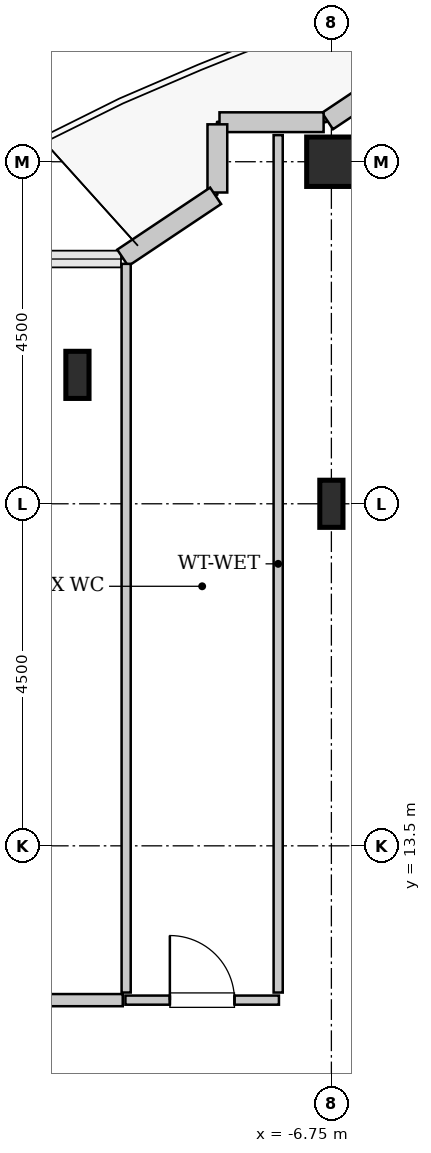
"""IFC4 building model, lengths in metres.
Left out: names, types, materials, properties, quantities, classifications, styles, units other than length and angle.
Written with IfcOpenShell. Run it as: python <this file> out.ifc"""

import sys

from ifc_helpers import new_model, si_unit, direction, frame, frame_2d, origin, origin_2d, place, context, subcontext, project, spatial, rectangle, hollow_rectangle, i_section, extrude, source, transform, mapped, element, fill, save


model = new_model("IFC4")
c1 = context("Model", 3, precision=1e-05, world=origin(), true_north=direction((0.0, 1.0)))
c2 = subcontext(c1, "Body", "Model", "MODEL_VIEW")
j1 = project(units=[si_unit("LENGTHUNIT", "METRE"), si_unit("PLANEANGLEUNIT", "RADIAN")], contexts=[c1])
p1 = place(None, origin())
s1 = spatial("IfcSite", under=j1, at=p1, CompositionType="ELEMENT")
p2 = place(p1, origin())
s2 = spatial("IfcBuilding", under=s1, at=p2, CompositionType="ELEMENT")
p3 = place(p2, frame((0.0, 0.0, 268.4)))
s3 = spatial("IfcBuildingStorey", under=s2, at=p3, CompositionType="ELEMENT", Elevation=268.4)
m1 = source(origin(), c2, "Body", "SweptSolid", [
    extrude(i_section(OverallWidth=0.305, OverallDepth=0.62, WebThickness=0.021, FlangeThickness=0.04, FilletRadius=0.027, at=origin_2d()), origin(), (0.0, 0.0, 1.0), 3.8),
])
for number, where, z_axis, x_axis in (
    (1, (-10.091, 19.696, 0.0), (0.0, 0.0, 1.0), (1.0, 0.0, 0.0)),
    (2, (-6.75, 18.0, 0.0), (0.0, 0.0, 1.0), (1.0, 0.0, 0.0)),
):
    element("IfcColumn", number, at=place(p3, frame(where, z_axis=z_axis, x_axis=x_axis)), inside=s3, PredefinedType="COLUMN", context=c2, shape_type="MappedRepresentation", body=[
        mapped(m1, transform((0.0, 0.0, 0.0), x_axis=(1.0, 0.0, 0.0), y_axis=(0.0, 1.0, 0.0), z_axis=(0.0, 0.0, 1.0), scale=1.0)),
    ])
m2 = source(origin(), c2, "Body", "SweptSolid", [
    extrude(hollow_rectangle(XDim=0.65, YDim=0.65, WallThickness=0.032, InnerFilletRadius=0.032, OuterFilletRadius=0.064, at=origin_2d()), origin(), (0.0, 0.0, 1.0), 3.8),
])
p4 = place(p3, frame((-6.75, 22.5, 0.0), z_axis=(0.0, 0.0, 1.0), x_axis=(1.0, 0.0, 0.0)))
e3 = element("IfcColumn", 3, at=p4, inside=s3, PredefinedType="COLUMN", context=c2, shape_type="MappedRepresentation", body=[
    mapped(m2, transform((0.0, 0.0, 0.0), x_axis=(1.0, 0.0, 0.0), y_axis=(0.0, 1.0, 0.0), z_axis=(0.0, 0.0, 1.0), scale=1.0)),
])
m3 = source(origin(), c2, "Body", "SweptSolid", [
    extrude(rectangle(XDim=0.565, YDim=0.26, at=frame_2d((0.283, 0.0))), origin(), (0.0, 0.0, 1.0), 3.55),
])
p5 = place(p3, frame((-6.331, 23.35, 0.0), z_axis=(0.0, 0.0, 1.0), x_axis=(-0.831651492666, -0.555297933317, 0.0)))
e4 = element("IfcWall", 4, at=p5, inside=s3, PredefinedType="SOLIDWALL", context=c2, shape_type="MappedRepresentation", body=[
    mapped(m3, transform((0.0, 0.0, 0.0), x_axis=(1.0, 0.0, 0.0), y_axis=(0.0, 1.0, 0.0), z_axis=(0.0, 0.0, 1.0), scale=1.0)),
])
m4 = source(origin(), c2, "Body", "SweptSolid", [
    extrude(rectangle(XDim=1.37, YDim=0.26, at=frame_2d((0.685, 0.0))), origin(), (0.0, 0.0, 1.0), 3.55),
])
p6 = place(p3, frame((-6.852, 23.02, 0.0), z_axis=(0.0, 0.0, 1.0), x_axis=(-1.0, 0.0, 0.0)))
e5 = element("IfcWall", 5, at=p6, inside=s3, PredefinedType="SOLIDWALL", context=c2, shape_type="MappedRepresentation", body=[
    mapped(m4, transform((0.0, 0.0, 0.0), x_axis=(1.0, 0.0, 0.0), y_axis=(0.0, 1.0, 0.0), z_axis=(0.0, 0.0, 1.0), scale=1.0)),
])
m5 = source(origin(), c2, "Body", "SweptSolid", [
    extrude(rectangle(XDim=0.897, YDim=0.26, at=frame_2d((0.448, 0.0))), origin(), (0.0, 0.0, 1.0), 3.55),
])
p7 = place(p3, frame((-8.25, 22.992, 0.0), z_axis=(0.0, 0.0, 1.0), x_axis=(0.0, -1.0, 0.0)))
e6 = element("IfcWall", 6, at=p7, inside=s3, PredefinedType="SOLIDWALL", context=c2, shape_type="MappedRepresentation", body=[
    mapped(m5, transform((0.0, 0.0, 0.0), x_axis=(1.0, 0.0, 0.0), y_axis=(0.0, 1.0, 0.0), z_axis=(0.0, 0.0, 1.0), scale=1.0)),
])
m6 = source(origin(), c2, "Body", "SweptSolid", [
    extrude(rectangle(XDim=1.469, YDim=0.26, at=frame_2d((0.734, 0.0))), origin(), (0.0, 0.0, 1.0), 3.55),
])
p8 = place(p3, frame((-8.273, 22.052, 0.0), z_axis=(0.0, 0.0, 1.0), x_axis=(-0.831461760506, -0.555581983884, 0.0)))
e7 = element("IfcWall", 7, at=p8, inside=s3, PredefinedType="SOLIDWALL", context=c2, shape_type="MappedRepresentation", body=[
    mapped(m6, transform((0.0, 0.0, 0.0), x_axis=(1.0, 0.0, 0.0), y_axis=(0.0, 1.0, 0.0), z_axis=(0.0, 0.0, 1.0), scale=1.0)),
])
m7 = source(origin(), c2, "Body", "SweptSolid", [
    extrude(rectangle(XDim=2.02, YDim=0.12, at=frame_2d((1.01, 0.0))), origin(), (0.0, 0.0, 1.0), 3.535),
])
p9 = place(p3, frame((-9.46, 11.47, 0.0), z_axis=(0.0, 0.0, 1.0), x_axis=(1.0, 0.0, 0.0)))
e8 = element("IfcWall", 8, at=p9, inside=s3, PredefinedType="PLUMBINGWALL", context=c2, shape_type="MappedRepresentation", body=[
    mapped(m7, transform((0.0, 0.0, 0.0), x_axis=(1.0, 0.0, 0.0), y_axis=(0.0, 1.0, 0.0), z_axis=(0.0, 0.0, 1.0), scale=1.0)),
])
p10 = place(p9, frame((0.585, 0.0, 0.0)))
e9 = element("IfcOpeningElement", 9, at=p10, cuts=e8, PredefinedType="OPENING", context=c2, shape_type="SweptSolid", body=[
    extrude(rectangle(XDim=0.85, YDim=2.1, at=frame_2d((0.425, 1.05))), frame((0.0, 0.07, 0.0), z_axis=(0.0, -1.0, 0.0), x_axis=(1.0, 0.0, 0.0)), (0.0, 0.0, 1.0), 0.14),
])
m8 = source(origin(), c2, "Body", "SweptSolid", [
    extrude(rectangle(XDim=11.28, YDim=0.12, at=frame_2d((5.64, 0.0))), origin(), (0.0, 0.0, 1.0), 3.535),
])
p11 = place(p3, frame((-7.45, 11.57, 0.0), z_axis=(0.0, 0.0, 1.0), x_axis=(0.0, 1.0, 0.0)))
e10 = element("IfcWall", 10, at=p11, inside=s3, PredefinedType="PLUMBINGWALL", context=c2, shape_type="MappedRepresentation", body=[
    mapped(m8, transform((0.0, 0.0, 0.0), x_axis=(1.0, 0.0, 0.0), y_axis=(0.0, 1.0, 0.0), z_axis=(0.0, 0.0, 1.0), scale=1.0)),
])
m9 = source(origin(), c2, "Body", "SweptSolid", [
    extrude(rectangle(XDim=9.587, YDim=0.12, at=frame_2d((4.793, 0.0))), origin(), (0.0, 0.0, 1.0), 3.535),
])
p12 = place(p3, frame((-9.45, 11.57, 0.0), z_axis=(0.0, 0.0, 1.0), x_axis=(0.0, 1.0, 0.0)))
e11 = element("IfcWall", 11, at=p12, inside=s3, PredefinedType="PLUMBINGWALL", context=c2, shape_type="MappedRepresentation", body=[
    mapped(m9, transform((0.0, 0.0, 0.0), x_axis=(1.0, 0.0, 0.0), y_axis=(0.0, 1.0, 0.0), z_axis=(0.0, 0.0, 1.0), scale=1.0)),
])
m10 = source(origin(), c2, "Body", "SweptSolid", [
    extrude(rectangle(XDim=4.125, YDim=0.16, at=frame_2d((2.062, 0.0))), origin(), (0.0, 0.0, 1.0), 3.535),
])
p13 = place(p3, frame((-13.62, 11.47, 0.0), z_axis=(0.0, 0.0, 1.0), x_axis=(1.0, 0.0, 0.0)))
e12 = element("IfcWall", 12, at=p13, inside=s3, PredefinedType="PARTITIONING", context=c2, shape_type="MappedRepresentation", body=[
    mapped(m10, transform((0.0, 0.0, 0.0), x_axis=(1.0, 0.0, 0.0), y_axis=(0.0, 1.0, 0.0), z_axis=(0.0, 0.0, 1.0), scale=1.0)),
])
p14 = place(p13, frame((1.587, 0.0, 0.0)))
e13 = element("IfcOpeningElement", 13, at=p14, cuts=e12, PredefinedType="OPENING", context=c2, shape_type="SweptSolid", body=[
    extrude(rectangle(XDim=0.95, YDim=2.1, at=frame_2d((0.475, 1.05))), frame((0.0, 0.09, 0.0), z_axis=(0.0, -1.0, 0.0), x_axis=(1.0, 0.0, 0.0)), (0.0, 0.0, 1.0), 0.18),
])
m11 = source(origin(), c2, "Body", "SweptSolid", [
    extrude(rectangle(XDim=0.85, YDim=2.1, at=frame_2d((0.425, 1.05))), frame((0.0, 0.025, 0.0), z_axis=(0.0, -1.0, 0.0), x_axis=(1.0, 0.0, 0.0)), (0.0, 0.0, 1.0), 0.05),
])
p15 = place(p10, origin())
e14 = element("IfcDoor", 14, at=p15, inside=s3, OperationType="SINGLE_SWING_LEFT", PredefinedType="DOOR", context=c2, shape_type="MappedRepresentation", body=[
    mapped(m11, transform((0.0, 0.0, 0.0), x_axis=(1.0, 0.0, 0.0), y_axis=(0.0, 1.0, 0.0), z_axis=(0.0, 0.0, 1.0), scale=1.0)),
])
fill(e9, e14)
save(model, sys.argv[1])
